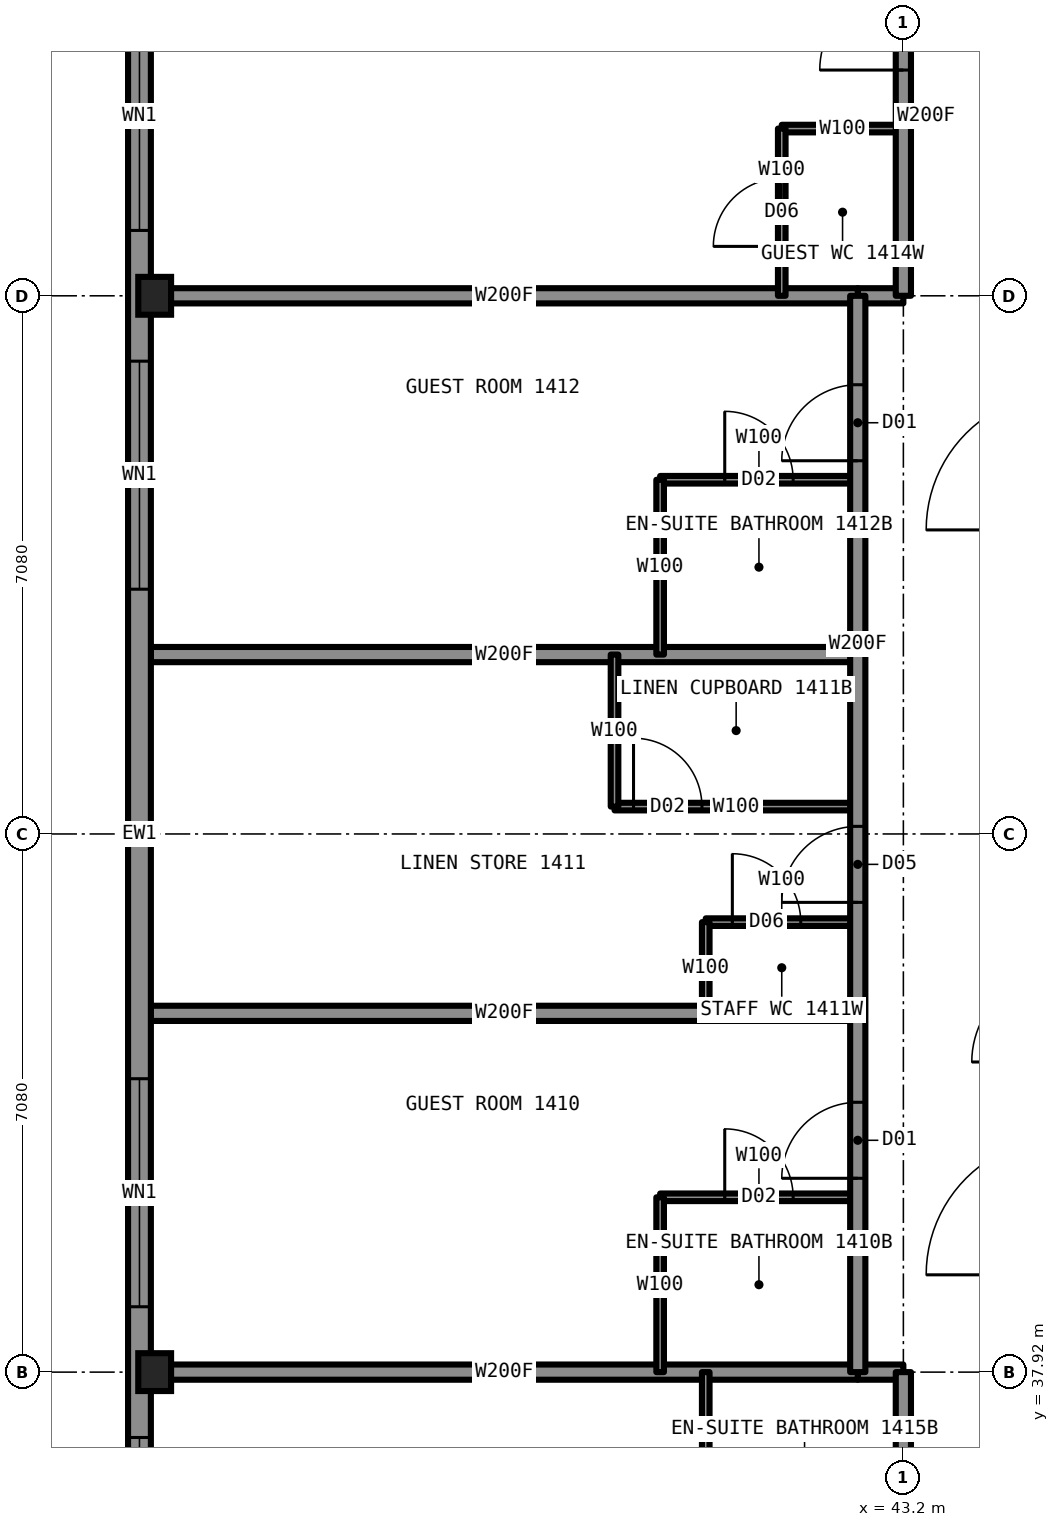
"""IFC4 building model, lengths in metres.
Left out: names, types, materials, properties, quantities, classifications, styles, units other than length and angle.
Written with IfcOpenShell. Run it as: python <this file> out.ifc"""

import sys

from ifc_helpers import new_model, si_unit, direction, frame, frame_2d, origin, origin_2d, place, context, subcontext, project, spatial, rectangle, i_section, extrude, element, fill, save


model = new_model("IFC4")
c1 = context("Model", 3, precision=1e-05, world=origin(), true_north=direction((0.0, 1.0)))
c2 = subcontext(c1, "Body", "Model", "MODEL_VIEW")
j1 = project(units=[si_unit("LENGTHUNIT", "METRE"), si_unit("PLANEANGLEUNIT", "RADIAN")], contexts=[c1])
p1 = place(None, origin())
s1 = spatial("IfcSite", under=j1, at=p1, CompositionType="ELEMENT")
p2 = place(p1, origin())
s2 = spatial("IfcBuilding", under=s1, at=p2, CompositionType="ELEMENT")
p3 = place(p2, frame((0.0, 0.0, 49.5)))
s3 = spatial("IfcBuildingStorey", under=s2, at=p3, CompositionType="ELEMENT", Elevation=49.5)
for number, where, z_axis, x_axis in (
    (1, (33.35, 37.92, 0.0), (0.0, 0.0, 1.0), (1.0, 0.0, 0.0)),
    (2, (33.35, 52.08, 0.0), (0.0, 0.0, 1.0), (1.0, 0.0, 0.0)),
):
    element("IfcColumn", number, at=place(p3, frame(where, z_axis=z_axis, x_axis=x_axis)), inside=s3, PredefinedType="COLUMN", context=c2, shape_type="SweptSolid", body=[
        extrude(i_section(OverallWidth=0.432, OverallDepth=0.498, WebThickness=0.056, FlangeThickness=0.089, at=origin_2d()), origin(), (0.0, 0.0, 1.0), 3.5),
    ])
p4 = place(p3, frame((40.6, 43.84, 0.0), z_axis=(0.0, 0.0, 1.0), x_axis=(1.0, 0.0, 0.0)))
e3 = element("IfcWall", 3, at=p4, inside=s3, PredefinedType="PARTITIONING", context=c2, shape_type="SweptSolid", body=[
    extrude(rectangle(XDim=2.0, YDim=0.1, at=frame_2d((1.0, 0.0))), origin(), (0.0, 0.0, 1.0), 3.33),
])
p5 = place(p4, frame((0.35, 0.0, 0.0)))
e4 = element("IfcOpeningElement", 4, at=p5, cuts=e3, PredefinedType="OPENING", context=c2, shape_type="SweptSolid", body=[
    extrude(rectangle(XDim=0.9, YDim=2.1, at=frame_2d((0.45, 1.05))), frame((0.0, 0.06, 0.0), z_axis=(0.0, -1.0, 0.0), x_axis=(1.0, 0.0, 0.0)), (0.0, 0.0, 1.0), 0.12),
])
p6 = place(p3, frame((33.3, 42.64, 0.0), z_axis=(0.0, 0.0, 1.0), x_axis=(1.0, 0.0, 0.0)))
e5 = element("IfcWall", 5, at=p6, inside=s3, PredefinedType="PARTITIONING", context=c2, shape_type="SweptSolid", body=[
    extrude(rectangle(XDim=9.3, YDim=0.2, at=frame_2d((4.65, 0.0))), origin(), (0.0, 0.0, 1.0), 2.723),
])
p7 = place(p3, frame((40.0, 40.22, 0.0), z_axis=(0.0, 0.0, 1.0), x_axis=(1.0, 0.0, 0.0)))
e6 = element("IfcWall", 6, at=p7, inside=s3, PredefinedType="PARTITIONING", context=c2, shape_type="SweptSolid", body=[
    extrude(rectangle(XDim=2.6, YDim=0.1, at=frame_2d((1.3, 0.0))), origin(), (0.0, 0.0, 1.0), 2.723),
])
p8 = place(p7, frame((0.85, 0.0, 0.0)))
e7 = element("IfcOpeningElement", 7, at=p8, cuts=e6, PredefinedType="OPENING", context=c2, shape_type="SweptSolid", body=[
    extrude(rectangle(XDim=0.9, YDim=2.1, at=frame_2d((0.45, 1.05))), frame((0.0, 0.06, 0.0), z_axis=(0.0, -1.0, 0.0), x_axis=(1.0, 0.0, 0.0)), (0.0, 0.0, 1.0), 0.12),
])
p9 = place(p3, frame((42.6, 37.92, 0.0), z_axis=(0.0, 0.0, 1.0), x_axis=(1.0, 0.0, 0.0)))
e8 = element("IfcWall", 8, at=p9, inside=s3, PredefinedType="PARTITIONING", context=c2, shape_type="SweptSolid", body=[
    extrude(rectangle(XDim=0.6, YDim=0.2, at=frame_2d((0.3, 0.0))), origin(), (0.0, 0.0, 1.0), 2.573),
])
p10 = place(p3, frame((33.3, 37.92, 0.0), z_axis=(0.0, 0.0, 1.0), x_axis=(1.0, 0.0, 0.0)))
e9 = element("IfcWall", 9, at=p10, inside=s3, PredefinedType="PARTITIONING", context=c2, shape_type="SweptSolid", body=[
    extrude(rectangle(XDim=9.3, YDim=0.2, at=frame_2d((4.65, 0.0))), origin(), (0.0, 0.0, 1.0), 2.573),
])
p11 = place(p3, frame((39.4, 45.36, 0.0), z_axis=(0.0, 0.0, 1.0), x_axis=(1.0, 0.0, 0.0)))
e10 = element("IfcWall", 10, at=p11, inside=s3, PredefinedType="PARTITIONING", context=c2, shape_type="SweptSolid", body=[
    extrude(rectangle(XDim=3.2, YDim=0.1, at=frame_2d((1.6, 0.0))), origin(), (0.0, 0.0, 1.0), 3.33),
])
p12 = place(p11, frame((0.25, 0.0, 0.0)))
e11 = element("IfcOpeningElement", 11, at=p12, cuts=e10, PredefinedType="OPENING", context=c2, shape_type="SweptSolid", body=[
    extrude(rectangle(XDim=0.9, YDim=2.1, at=frame_2d((0.45, 1.05))), frame((0.0, 0.06, 0.0), z_axis=(0.0, -1.0, 0.0), x_axis=(1.0, 0.0, 0.0)), (0.0, 0.0, 1.0), 0.12),
])
p13 = place(p3, frame((33.3, 47.36, 0.0), z_axis=(0.0, 0.0, 1.0), x_axis=(1.0, 0.0, 0.0)))
e12 = element("IfcWall", 12, at=p13, inside=s3, PredefinedType="PARTITIONING", context=c2, shape_type="SweptSolid", body=[
    extrude(rectangle(XDim=9.3, YDim=0.2, at=frame_2d((4.65, 0.0))), origin(), (0.0, 0.0, 1.0), 2.723),
])
p14 = place(p3, frame((40.0, 49.66, 0.0), z_axis=(0.0, 0.0, 1.0), x_axis=(1.0, 0.0, 0.0)))
e13 = element("IfcWall", 13, at=p14, inside=s3, PredefinedType="PARTITIONING", context=c2, shape_type="SweptSolid", body=[
    extrude(rectangle(XDim=2.6, YDim=0.1, at=frame_2d((1.3, 0.0))), origin(), (0.0, 0.0, 1.0), 2.723),
])
p15 = place(p14, frame((0.85, 0.0, 0.0)))
e14 = element("IfcOpeningElement", 14, at=p15, cuts=e13, PredefinedType="OPENING", context=c2, shape_type="SweptSolid", body=[
    extrude(rectangle(XDim=0.9, YDim=2.1, at=frame_2d((0.45, 1.05))), frame((0.0, 0.06, 0.0), z_axis=(0.0, -1.0, 0.0), x_axis=(1.0, 0.0, 0.0)), (0.0, 0.0, 1.0), 0.12),
])
p16 = place(p3, frame((42.6, 52.08, 0.0), z_axis=(0.0, 0.0, 1.0), x_axis=(1.0, 0.0, 0.0)))
e15 = element("IfcWall", 15, at=p16, inside=s3, PredefinedType="PARTITIONING", context=c2, shape_type="SweptSolid", body=[
    extrude(rectangle(XDim=0.6, YDim=0.2, at=frame_2d((0.3, 0.0))), origin(), (0.0, 0.0, 1.0), 2.573),
])
p17 = place(p3, frame((33.3, 52.08, 0.0), z_axis=(0.0, 0.0, 1.0), x_axis=(1.0, 0.0, 0.0)))
e16 = element("IfcWall", 16, at=p17, inside=s3, PredefinedType="PARTITIONING", context=c2, shape_type="SweptSolid", body=[
    extrude(rectangle(XDim=9.3, YDim=0.2, at=frame_2d((4.65, 0.0))), origin(), (0.0, 0.0, 1.0), 2.573),
])
p18 = place(p3, frame((41.6, 54.28, 0.0), z_axis=(0.0, 0.0, 1.0), x_axis=(1.0, 0.0, 0.0)))
e17 = element("IfcWall", 17, at=p18, inside=s3, PredefinedType="PARTITIONING", context=c2, shape_type="SweptSolid", body=[
    extrude(rectangle(XDim=1.6, YDim=0.1, at=frame_2d((0.8, 0.0))), origin(), (0.0, 0.0, 1.0), 2.723),
])
p19 = place(p3, frame((43.2, 33.2, 0.0), z_axis=(0.0, 0.0, 1.0), x_axis=(0.0, 1.0, 0.0)))
e18 = element("IfcWall", 18, at=p19, inside=s3, PredefinedType="PARTITIONING", context=c2, shape_type="SweptSolid", body=[
    extrude(rectangle(XDim=4.72, YDim=0.2, at=frame_2d((2.36, 0.0))), origin(), (0.0, 0.0, 1.0), 3.33),
])
p20 = place(p19, frame((0.66, 0.0, 0.0)))
e19 = element("IfcOpeningElement", 19, at=p20, cuts=e18, PredefinedType="OPENING", context=c2, shape_type="SweptSolid", body=[
    extrude(rectangle(XDim=1.1, YDim=2.2, at=frame_2d((0.55, 1.1))), frame((0.0, 0.11, 0.0), z_axis=(0.0, -1.0, 0.0), x_axis=(1.0, 0.0, 0.0)), (0.0, 0.0, 1.0), 0.22),
])
p21 = place(p3, frame((43.2, 52.08, 0.0), z_axis=(0.0, 0.0, 1.0), x_axis=(0.0, 1.0, 0.0)))
e20 = element("IfcWall", 20, at=p21, inside=s3, PredefinedType="PARTITIONING", context=c2, shape_type="SweptSolid", body=[
    extrude(rectangle(XDim=4.72, YDim=0.2, at=frame_2d((2.36, 0.0))), origin(), (0.0, 0.0, 1.0), 3.33),
])
p22 = place(p21, frame((2.97, 0.0, 0.0)))
e21 = element("IfcOpeningElement", 21, at=p22, cuts=e20, PredefinedType="OPENING", context=c2, shape_type="SweptSolid", body=[
    extrude(rectangle(XDim=1.1, YDim=2.2, at=frame_2d((0.55, 1.1))), frame((0.0, 0.11, 0.0), z_axis=(0.0, -1.0, 0.0), x_axis=(1.0, 0.0, 0.0)), (0.0, 0.0, 1.0), 0.22),
])
p23 = place(p3, frame((42.6, 37.92, 0.0), z_axis=(0.0, 0.0, 1.0), x_axis=(0.0, 1.0, 0.0)))
e22 = element("IfcWall", 22, at=p23, inside=s3, PredefinedType="PARTITIONING", context=c2, shape_type="SweptSolid", body=[
    extrude(rectangle(XDim=14.16, YDim=0.2, at=frame_2d((7.08, 0.0))), origin(), (0.0, 0.0, 1.0), 3.33),
])
p24 = place(p23, frame((2.55, 0.0, 0.0)))
e23 = element("IfcOpeningElement", 23, at=p24, cuts=e22, PredefinedType="OPENING", context=c2, shape_type="SweptSolid", body=[
    extrude(rectangle(XDim=1.0, YDim=2.2, at=frame_2d((0.5, 1.1))), frame((0.0, 0.11, 0.0), z_axis=(0.0, -1.0, 0.0), x_axis=(1.0, 0.0, 0.0)), (0.0, 0.0, 1.0), 0.22),
])
p25 = place(p23, frame((6.18, 0.0, 0.0)))
e24 = element("IfcOpeningElement", 24, at=p25, cuts=e22, PredefinedType="OPENING", context=c2, shape_type="SweptSolid", body=[
    extrude(rectangle(XDim=1.0, YDim=2.2, at=frame_2d((0.5, 1.1))), frame((0.0, 0.11, 0.0), z_axis=(0.0, -1.0, 0.0), x_axis=(1.0, 0.0, 0.0)), (0.0, 0.0, 1.0), 0.22),
])
p26 = place(p23, frame((11.99, 0.0, 0.0)))
e25 = element("IfcOpeningElement", 25, at=p26, cuts=e22, PredefinedType="OPENING", context=c2, shape_type="SweptSolid", body=[
    extrude(rectangle(XDim=1.0, YDim=2.2, at=frame_2d((0.5, 1.1))), frame((0.0, 0.11, 0.0), z_axis=(0.0, -1.0, 0.0), x_axis=(1.0, 0.0, 0.0)), (0.0, 0.0, 1.0), 0.22),
])
p27 = place(p3, frame((41.6, 52.08, 0.0), z_axis=(0.0, 0.0, 1.0), x_axis=(0.0, 1.0, 0.0)))
e26 = element("IfcWall", 26, at=p27, inside=s3, PredefinedType="PARTITIONING", context=c2, shape_type="SweptSolid", body=[
    extrude(rectangle(XDim=2.2, YDim=0.1, at=frame_2d((1.1, 0.0))), origin(), (0.0, 0.0, 1.0), 3.33),
])
p28 = place(p27, frame((0.65, 0.0, 0.0)))
e27 = element("IfcOpeningElement", 27, at=p28, cuts=e26, PredefinedType="OPENING", context=c2, shape_type="SweptSolid", body=[
    extrude(rectangle(XDim=0.9, YDim=2.1, at=frame_2d((0.45, 1.05))), frame((0.0, 0.06, 0.0), z_axis=(0.0, -1.0, 0.0), x_axis=(1.0, 0.0, 0.0)), (0.0, 0.0, 1.0), 0.12),
])
p29 = place(p3, frame((40.6, 35.32, 0.0), z_axis=(0.0, 0.0, 1.0), x_axis=(0.0, 1.0, 0.0)))
e28 = element("IfcWall", 28, at=p29, inside=s3, PredefinedType="PARTITIONING", context=c2, shape_type="SweptSolid", body=[
    extrude(rectangle(XDim=2.6, YDim=0.1, at=frame_2d((1.3, 0.0))), origin(), (0.0, 0.0, 1.0), 3.33),
])
p30 = place(p3, frame((40.6, 42.64, 0.0), z_axis=(0.0, 0.0, 1.0), x_axis=(0.0, 1.0, 0.0)))
e29 = element("IfcWall", 29, at=p30, inside=s3, PredefinedType="PARTITIONING", context=c2, shape_type="SweptSolid", body=[
    extrude(rectangle(XDim=1.2, YDim=0.1, at=frame_2d((0.6, 0.0))), origin(), (0.0, 0.0, 1.0), 3.33),
])
p31 = place(p3, frame((40.0, 37.92, 0.0), z_axis=(0.0, 0.0, 1.0), x_axis=(0.0, 1.0, 0.0)))
e30 = element("IfcWall", 30, at=p31, inside=s3, PredefinedType="PARTITIONING", context=c2, shape_type="SweptSolid", body=[
    extrude(rectangle(XDim=2.3, YDim=0.1, at=frame_2d((1.15, 0.0))), origin(), (0.0, 0.0, 1.0), 3.33),
])
p32 = place(p3, frame((40.0, 47.36, 0.0), z_axis=(0.0, 0.0, 1.0), x_axis=(0.0, 1.0, 0.0)))
e31 = element("IfcWall", 31, at=p32, inside=s3, PredefinedType="PARTITIONING", context=c2, shape_type="SweptSolid", body=[
    extrude(rectangle(XDim=2.3, YDim=0.1, at=frame_2d((1.15, 0.0))), origin(), (0.0, 0.0, 1.0), 3.33),
])
p33 = place(p3, frame((39.4, 45.36, 0.0), z_axis=(0.0, 0.0, 1.0), x_axis=(0.0, 1.0, 0.0)))
e32 = element("IfcWall", 32, at=p33, inside=s3, PredefinedType="PARTITIONING", context=c2, shape_type="SweptSolid", body=[
    extrude(rectangle(XDim=2.0, YDim=0.1, at=frame_2d((1.0, 0.0))), origin(), (0.0, 0.0, 1.0), 3.33),
])
p34 = place(p3, frame((33.15, 61.5, 0.0), z_axis=(0.0, 0.0, 1.0), x_axis=(0.0, -1.0, 0.0)))
e33 = element("IfcWall", 33, at=p34, inside=s3, PredefinedType="SOLIDWALL", context=c2, shape_type="SweptSolid", body=[
    extrude(rectangle(XDim=33.0, YDim=0.3, at=frame_2d((16.5, 0.0))), origin(), (0.0, 0.0, 1.0), 2.83),
])
p35 = place(p34, frame((0.85, 0.0, 0.5)))
e34 = element("IfcOpeningElement", 34, at=p35, cuts=e33, PredefinedType="OPENING", context=c2, shape_type="SweptSolid", body=[
    extrude(rectangle(XDim=3.0, YDim=2.0, at=frame_2d((1.5, 1.0))), frame((0.0, 0.16, 0.0), z_axis=(0.0, -1.0, 0.0), x_axis=(1.0, 0.0, 0.0)), (0.0, 0.0, 1.0), 0.32),
])
p36 = place(p34, frame((5.56, 0.0, 0.5)))
e35 = element("IfcOpeningElement", 35, at=p36, cuts=e33, PredefinedType="OPENING", context=c2, shape_type="SweptSolid", body=[
    extrude(rectangle(XDim=3.0, YDim=2.0, at=frame_2d((1.5, 1.0))), frame((0.0, 0.16, 0.0), z_axis=(0.0, -1.0, 0.0), x_axis=(1.0, 0.0, 0.0)), (0.0, 0.0, 1.0), 0.32),
])
p37 = place(p34, frame((10.28, 0.0, 1.1)))
e36 = element("IfcOpeningElement", 36, at=p37, cuts=e33, PredefinedType="OPENING", context=c2, shape_type="SweptSolid", body=[
    extrude(rectangle(XDim=1.1, YDim=1.4, at=frame_2d((0.55, 0.7))), frame((0.0, 0.16, 0.0), z_axis=(0.0, -1.0, 0.0), x_axis=(1.0, 0.0, 0.0)), (0.0, 0.0, 1.0), 0.32),
])
p38 = place(p34, frame((15.0, 0.0, 0.5)))
e37 = element("IfcOpeningElement", 37, at=p38, cuts=e33, PredefinedType="OPENING", context=c2, shape_type="SweptSolid", body=[
    extrude(rectangle(XDim=3.0, YDim=2.0, at=frame_2d((1.5, 1.0))), frame((0.0, 0.16, 0.0), z_axis=(0.0, -1.0, 0.0), x_axis=(1.0, 0.0, 0.0)), (0.0, 0.0, 1.0), 0.32),
])
p39 = place(p34, frame((21.62, 0.0, 1.1)))
e38 = element("IfcOpeningElement", 38, at=p39, cuts=e33, PredefinedType="OPENING", context=c2, shape_type="SweptSolid", body=[
    extrude(rectangle(XDim=1.1, YDim=1.4, at=frame_2d((0.55, 0.7))), frame((0.0, 0.16, 0.0), z_axis=(0.0, -1.0, 0.0), x_axis=(1.0, 0.0, 0.0)), (0.0, 0.0, 1.0), 0.32),
])
p40 = place(p34, frame((24.44, 0.0, 0.5)))
e39 = element("IfcOpeningElement", 39, at=p40, cuts=e33, PredefinedType="OPENING", context=c2, shape_type="SweptSolid", body=[
    extrude(rectangle(XDim=3.0, YDim=2.0, at=frame_2d((1.5, 1.0))), frame((0.0, 0.16, 0.0), z_axis=(0.0, -1.0, 0.0), x_axis=(1.0, 0.0, 0.0)), (0.0, 0.0, 1.0), 0.32),
])
p41 = place(p34, frame((29.15, 0.0, 0.5)))
e40 = element("IfcOpeningElement", 40, at=p41, cuts=e33, PredefinedType="OPENING", context=c2, shape_type="SweptSolid", body=[
    extrude(rectangle(XDim=3.0, YDim=2.0, at=frame_2d((1.5, 1.0))), frame((0.0, 0.16, 0.0), z_axis=(0.0, -1.0, 0.0), x_axis=(1.0, 0.0, 0.0)), (0.0, 0.0, 1.0), 0.32),
])
p42 = place(p24, origin())
e41 = element("IfcDoor", 41, at=p42, inside=s3, OperationType="SINGLE_SWING_LEFT", PredefinedType="DOOR", context=c2, shape_type="SweptSolid", body=[
    extrude(rectangle(XDim=1.0, YDim=2.2, at=frame_2d((0.5, 1.1))), frame((0.0, 0.025, 0.0), z_axis=(0.0, -1.0, 0.0), x_axis=(1.0, 0.0, 0.0)), (0.0, 0.0, 1.0), 0.05),
])
fill(e23, e41)
p43 = place(p8, origin())
e42 = element("IfcDoor", 42, at=p43, inside=s3, OperationType="SINGLE_SWING_RIGHT", PredefinedType="DOOR", context=c2, shape_type="SweptSolid", body=[
    extrude(rectangle(XDim=0.9, YDim=2.1, at=frame_2d((0.45, 1.05))), frame((0.0, 0.025, 0.0), z_axis=(0.0, -1.0, 0.0), x_axis=(1.0, 0.0, 0.0)), (0.0, 0.0, 1.0), 0.05),
])
fill(e7, e42)
p44 = place(p25, origin())
e43 = element("IfcDoor", 43, at=p44, inside=s3, OperationType="SINGLE_SWING_LEFT", PredefinedType="DOOR", context=c2, shape_type="SweptSolid", body=[
    extrude(rectangle(XDim=1.0, YDim=2.2, at=frame_2d((0.5, 1.1))), frame((0.0, 0.025, 0.0), z_axis=(0.0, -1.0, 0.0), x_axis=(1.0, 0.0, 0.0)), (0.0, 0.0, 1.0), 0.05),
])
fill(e24, e43)
p45 = place(p12, origin())
e44 = element("IfcDoor", 44, at=p45, inside=s3, OperationType="SINGLE_SWING_RIGHT", PredefinedType="DOOR", context=c2, shape_type="SweptSolid", body=[
    extrude(rectangle(XDim=0.9, YDim=2.1, at=frame_2d((0.45, 1.05))), frame((0.0, 0.025, 0.0), z_axis=(0.0, -1.0, 0.0), x_axis=(1.0, 0.0, 0.0)), (0.0, 0.0, 1.0), 0.05),
])
fill(e11, e44)
p46 = place(p5, origin())
e45 = element("IfcDoor", 45, at=p46, inside=s3, OperationType="SINGLE_SWING_LEFT", PredefinedType="DOOR", context=c2, shape_type="SweptSolid", body=[
    extrude(rectangle(XDim=0.9, YDim=2.1, at=frame_2d((0.45, 1.05))), frame((0.0, 0.025, 0.0), z_axis=(0.0, -1.0, 0.0), x_axis=(1.0, 0.0, 0.0)), (0.0, 0.0, 1.0), 0.05),
])
fill(e4, e45)
p47 = place(p26, origin())
e46 = element("IfcDoor", 46, at=p47, inside=s3, OperationType="SINGLE_SWING_LEFT", PredefinedType="DOOR", context=c2, shape_type="SweptSolid", body=[
    extrude(rectangle(XDim=1.0, YDim=2.2, at=frame_2d((0.5, 1.1))), frame((0.0, 0.025, 0.0), z_axis=(0.0, -1.0, 0.0), x_axis=(1.0, 0.0, 0.0)), (0.0, 0.0, 1.0), 0.05),
])
fill(e25, e46)
p48 = place(p15, origin())
e47 = element("IfcDoor", 47, at=p48, inside=s3, OperationType="SINGLE_SWING_RIGHT", PredefinedType="DOOR", context=c2, shape_type="SweptSolid", body=[
    extrude(rectangle(XDim=0.9, YDim=2.1, at=frame_2d((0.45, 1.05))), frame((0.0, 0.025, 0.0), z_axis=(0.0, -1.0, 0.0), x_axis=(1.0, 0.0, 0.0)), (0.0, 0.0, 1.0), 0.05),
])
fill(e14, e47)
p49 = place(p22, origin())
e48 = element("IfcDoor", 48, at=p49, inside=s3, OperationType="SINGLE_SWING_LEFT", PredefinedType="DOOR", context=c2, shape_type="SweptSolid", body=[
    extrude(rectangle(XDim=1.1, YDim=2.2, at=frame_2d((0.55, 1.1))), frame((0.0, 0.025, 0.0), z_axis=(0.0, -1.0, 0.0), x_axis=(1.0, 0.0, 0.0)), (0.0, 0.0, 1.0), 0.05),
])
fill(e21, e48)
p50 = place(p28, origin())
e49 = element("IfcDoor", 49, at=p50, inside=s3, OperationType="SINGLE_SWING_LEFT", PredefinedType="DOOR", context=c2, shape_type="SweptSolid", body=[
    extrude(rectangle(XDim=0.9, YDim=2.1, at=frame_2d((0.45, 1.05))), frame((0.0, 0.025, 0.0), z_axis=(0.0, -1.0, 0.0), x_axis=(1.0, 0.0, 0.0)), (0.0, 0.0, 1.0), 0.05),
])
fill(e27, e49)
p51 = place(p36, origin())
e50 = element("IfcWindow", 50, at=p51, inside=s3, PartitioningType="SINGLE_PANEL", PredefinedType="WINDOW", context=c2, shape_type="SweptSolid", body=[
    extrude(rectangle(XDim=3.0, YDim=2.0, at=frame_2d((1.5, 1.0))), frame((0.0, 0.03, 0.0), z_axis=(0.0, -1.0, 0.0), x_axis=(1.0, 0.0, 0.0)), (0.0, 0.0, 1.0), 0.06),
])
fill(e35, e50)
p52 = place(p37, origin())
e51 = element("IfcWindow", 51, at=p52, inside=s3, PartitioningType="SINGLE_PANEL", PredefinedType="WINDOW", context=c2, shape_type="SweptSolid", body=[
    extrude(rectangle(XDim=1.1, YDim=1.4, at=frame_2d((0.55, 0.7))), frame((0.0, 0.03, 0.0), z_axis=(0.0, -1.0, 0.0), x_axis=(1.0, 0.0, 0.0)), (0.0, 0.0, 1.0), 0.06),
])
fill(e36, e51)
p53 = place(p38, origin())
e52 = element("IfcWindow", 52, at=p53, inside=s3, PartitioningType="SINGLE_PANEL", PredefinedType="WINDOW", context=c2, shape_type="SweptSolid", body=[
    extrude(rectangle(XDim=3.0, YDim=2.0, at=frame_2d((1.5, 1.0))), frame((0.0, 0.03, 0.0), z_axis=(0.0, -1.0, 0.0), x_axis=(1.0, 0.0, 0.0)), (0.0, 0.0, 1.0), 0.06),
])
fill(e37, e52)
p54 = place(p39, origin())
e53 = element("IfcWindow", 53, at=p54, inside=s3, PartitioningType="SINGLE_PANEL", PredefinedType="WINDOW", context=c2, shape_type="SweptSolid", body=[
    extrude(rectangle(XDim=1.1, YDim=1.4, at=frame_2d((0.55, 0.7))), frame((0.0, 0.03, 0.0), z_axis=(0.0, -1.0, 0.0), x_axis=(1.0, 0.0, 0.0)), (0.0, 0.0, 1.0), 0.06),
])
fill(e38, e53)
p55 = place(p40, origin())
e54 = element("IfcWindow", 54, at=p55, inside=s3, PartitioningType="SINGLE_PANEL", PredefinedType="WINDOW", context=c2, shape_type="SweptSolid", body=[
    extrude(rectangle(XDim=3.0, YDim=2.0, at=frame_2d((1.5, 1.0))), frame((0.0, 0.03, 0.0), z_axis=(0.0, -1.0, 0.0), x_axis=(1.0, 0.0, 0.0)), (0.0, 0.0, 1.0), 0.06),
])
fill(e39, e54)
save(model, sys.argv[1])
